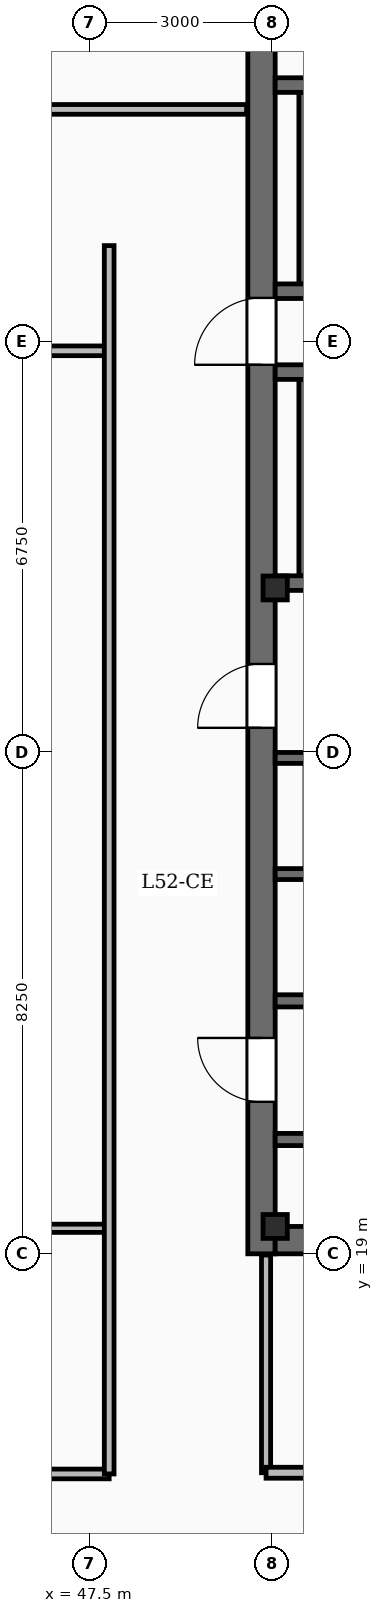
"""IFC4 building model, lengths in metres.
Left out: names, types, materials, properties, quantities, classifications, styles, units other than length and angle.
Written with IfcOpenShell. Run it as: python <this file> out.ifc"""

import sys

from ifc_helpers import new_model, si_unit, direction, frame, frame_2d, origin, origin_2d, place, context, subcontext, project, spatial, rectangle, i_section, extrude, element, fill, save


model = new_model("IFC4")
c1 = context("Model", 3, precision=1e-05, world=origin(), true_north=direction((0.0, 1.0)))
c2 = subcontext(c1, "Body", "Model", "MODEL_VIEW")
j1 = project(units=[si_unit("LENGTHUNIT", "METRE"), si_unit("PLANEANGLEUNIT", "RADIAN")], contexts=[c1])
p1 = place(None, origin())
s1 = spatial("IfcSite", under=j1, at=p1, CompositionType="ELEMENT")
p2 = place(p1, origin())
s2 = spatial("IfcBuilding", under=s1, at=p2, CompositionType="ELEMENT")
p3 = place(p2, frame((0.0, 0.0, 216.15)))
s3 = spatial("IfcBuildingStorey", under=s2, at=p3, CompositionType="ELEMENT", Elevation=216.15)
p4 = place(p3, frame((50.325, 19.0, -0.45), z_axis=(0.0, 0.0, 1.0), x_axis=(0.0, 1.0, 0.0)))
e1 = element("IfcWall", 1, at=p4, inside=s3, PredefinedType="SHEAR", context=c2, shape_type="SweptSolid", body=[
    extrude(rectangle(XDim=20.8, YDim=0.45, at=frame_2d((10.4, 0.0))), origin(), (0.0, 0.0, 1.0), 4.98),
])
p5 = place(p4, frame((2.5, 0.0, 0.45)))
e2 = element("IfcOpeningElement", 2, at=p5, cuts=e1, PredefinedType="OPENING", context=c2, shape_type="SweptSolid", body=[
    extrude(rectangle(XDim=1.05, YDim=2.15, at=frame_2d((0.525, 1.075))), frame((0.0, 0.235, 0.0), z_axis=(0.0, -1.0, 0.0), x_axis=(1.0, 0.0, 0.0)), (0.0, 0.0, 1.0), 0.47),
])
p6 = place(p4, frame((8.65, 0.0, 0.45)))
e3 = element("IfcOpeningElement", 3, at=p6, cuts=e1, PredefinedType="OPENING", context=c2, shape_type="SweptSolid", body=[
    extrude(rectangle(XDim=1.05, YDim=2.15, at=frame_2d((0.525, 1.075))), frame((0.0, 0.235, 0.0), z_axis=(0.0, -1.0, 0.0), x_axis=(1.0, 0.0, 0.0)), (0.0, 0.0, 1.0), 0.47),
])
p7 = place(p4, frame((14.62, 0.0, 0.45)))
e4 = element("IfcOpeningElement", 4, at=p7, cuts=e1, PredefinedType="OPENING", context=c2, shape_type="SweptSolid", body=[
    extrude(rectangle(XDim=1.1, YDim=2.15, at=frame_2d((0.55, 1.075))), frame((0.0, 0.235, 0.0), z_axis=(0.0, -1.0, 0.0), x_axis=(1.0, 0.0, 0.0)), (0.0, 0.0, 1.0), 0.47),
])
p8 = place(p3, frame((50.55, 19.225, -0.45), z_axis=(0.0, 0.0, 1.0), x_axis=(1.0, 0.0, 0.0)))
e5 = element("IfcWall", 5, at=p8, inside=s3, PredefinedType="SHEAR", context=c2, shape_type="SweptSolid", body=[
    extrude(rectangle(XDim=9.8, YDim=0.45, at=frame_2d((4.9, 0.0))), origin(), (0.0, 0.0, 1.0), 4.98),
])
for number, where, z_axis, x_axis in (
    (6, (50.55, 19.45, -0.45), (0.0, 0.0, 1.0), (1.0, 0.0, 0.0)),
    (7, (50.55, 29.95, -0.45), (0.0, 0.0, 1.0), (1.0, 0.0, 0.0)),
):
    element("IfcColumn", number, at=place(p3, frame(where, z_axis=z_axis, x_axis=x_axis)), inside=s3, PredefinedType="COLUMN", context=c2, shape_type="SweptSolid", body=[
        extrude(i_section(OverallWidth=0.399, OverallDepth=0.393, WebThickness=0.023, FlangeThickness=0.037, FilletRadius=0.02, at=origin_2d()), origin(), (0.0, 0.0, 1.0), 4.98),
    ])
p9 = place(p3, frame((60.35, 30.03, 0.0), z_axis=(0.0, 0.0, 1.0), x_axis=(-1.0, 0.0, 0.0)))
e8 = element("IfcWall", 8, at=p9, inside=s3, PredefinedType="SOLIDWALL", context=c2, shape_type="SweptSolid", body=[
    extrude(rectangle(XDim=9.8, YDim=0.24, at=frame_2d((4.9, 0.0))), origin(), (0.0, 0.0, 1.0), 4.53),
])
p10 = place(p9, frame((7.83, 0.0, 0.0)))
e9 = element("IfcOpeningElement", 9, at=p10, cuts=e8, PredefinedType="OPENING", context=c2, shape_type="SweptSolid", body=[
    extrude(rectangle(XDim=1.1, YDim=2.15, at=frame_2d((0.55, 1.075))), frame((0.0, 0.13, 0.0), z_axis=(0.0, -1.0, 0.0), x_axis=(1.0, 0.0, 0.0)), (0.0, 0.0, 1.0), 0.26),
])
p11 = place(p3, frame((50.55, 33.5, 0.0), z_axis=(0.0, 0.0, 1.0), x_axis=(1.0, 0.0, 0.0)))
e10 = element("IfcWall", 10, at=p11, inside=s3, PredefinedType="SOLIDWALL", context=c2, shape_type="SweptSolid", body=[
    extrude(rectangle(XDim=9.8, YDim=0.24, at=frame_2d((4.9, 0.0))), origin(), (0.0, 0.0, 1.0), 4.53),
])
p12 = place(p3, frame((51.06, 30.15, 0.0), z_axis=(0.0, 0.0, 1.0), x_axis=(0.0, 1.0, 0.0)))
e11 = element("IfcWall", 11, at=p12, inside=s3, PredefinedType="SOLIDWALL", context=c2, shape_type="SweptSolid", body=[
    extrude(rectangle(XDim=3.23, YDim=0.24, at=frame_2d((1.615, 0.0))), origin(), (0.0, 0.0, 1.0), 4.53),
])
p13 = place(p3, frame((60.35, 34.83, 0.0), z_axis=(0.0, 0.0, 1.0), x_axis=(-1.0, 0.0, 0.0)))
e12 = element("IfcWall", 12, at=p13, inside=s3, PredefinedType="SOLIDWALL", context=c2, shape_type="SweptSolid", body=[
    extrude(rectangle(XDim=9.8, YDim=0.24, at=frame_2d((4.9, 0.0))), origin(), (0.0, 0.0, 1.0), 4.53),
])
p14 = place(p13, frame((7.87, 0.0, 0.0)))
e13 = element("IfcOpeningElement", 13, at=p14, cuts=e12, PredefinedType="OPENING", context=c2, shape_type="SweptSolid", body=[
    extrude(rectangle(XDim=1.1, YDim=2.15, at=frame_2d((0.55, 1.075))), frame((0.0, 0.13, 0.0), z_axis=(0.0, -1.0, 0.0), x_axis=(1.0, 0.0, 0.0)), (0.0, 0.0, 1.0), 0.26),
])
p15 = place(p3, frame((50.55, 38.22, 0.0), z_axis=(0.0, 0.0, 1.0), x_axis=(1.0, 0.0, 0.0)))
e14 = element("IfcWall", 14, at=p15, inside=s3, PredefinedType="SOLIDWALL", context=c2, shape_type="SweptSolid", body=[
    extrude(rectangle(XDim=9.8, YDim=0.24, at=frame_2d((4.9, 0.0))), origin(), (0.0, 0.0, 1.0), 4.53),
])
p16 = place(p3, frame((51.06, 34.95, 0.0), z_axis=(0.0, 0.0, 1.0), x_axis=(0.0, 1.0, 0.0)))
e15 = element("IfcWall", 15, at=p16, inside=s3, PredefinedType="SOLIDWALL", context=c2, shape_type="SweptSolid", body=[
    extrude(rectangle(XDim=3.15, YDim=0.24, at=frame_2d((1.575, 0.0))), origin(), (0.0, 0.0, 1.0), 4.53),
])
p17 = place(p3, frame((50.55, 27.155, 0.0), z_axis=(0.0, 0.0, 1.0), x_axis=(1.0, 0.0, 0.0)))
e16 = element("IfcWall", 16, at=p17, inside=s3, PredefinedType="SOLIDWALL", context=c2, shape_type="SweptSolid", body=[
    extrude(rectangle(XDim=3.315, YDim=0.18, at=frame_2d((1.657, 0.0))), origin(), (0.0, 0.0, 1.0), 4.53),
])
p18 = place(p17, frame((1.235, 0.0, 0.0)))
e17 = element("IfcOpeningElement", 17, at=p18, cuts=e16, PredefinedType="OPENING", context=c2, shape_type="SweptSolid", body=[
    extrude(rectangle(XDim=1.35, YDim=2.3, at=frame_2d((0.675, 1.15))), frame((0.0, 0.1, 0.0), z_axis=(0.0, -1.0, 0.0), x_axis=(1.0, 0.0, 0.0)), (0.0, 0.0, 1.0), 0.2),
])
p19 = place(p3, frame((50.55, 25.245, 0.0), z_axis=(0.0, 0.0, 1.0), x_axis=(1.0, 0.0, 0.0)))
e18 = element("IfcWall", 18, at=p19, inside=s3, PredefinedType="SOLIDWALL", context=c2, shape_type="SweptSolid", body=[
    extrude(rectangle(XDim=3.315, YDim=0.18, at=frame_2d((1.657, 0.0))), origin(), (0.0, 0.0, 1.0), 4.53),
])
p20 = place(p3, frame((50.55, 20.88, 0.0), z_axis=(0.0, 0.0, 1.0), x_axis=(1.0, 0.0, 0.0)))
e19 = element("IfcWall", 19, at=p20, inside=s3, PredefinedType="SOLIDWALL", context=c2, shape_type="SweptSolid", body=[
    extrude(rectangle(XDim=9.8, YDim=0.2, at=frame_2d((4.9, 0.0))), origin(), (0.0, 0.0, 1.0), 3.59),
])
p21 = place(p20, frame((1.4, 0.0, 0.0)))
e20 = element("IfcOpeningElement", 20, at=p21, cuts=e19, PredefinedType="OPENING", context=c2, shape_type="SweptSolid", body=[
    extrude(rectangle(XDim=1.05, YDim=2.15, at=frame_2d((0.525, 1.075))), frame((0.0, 0.11, 0.0), z_axis=(0.0, -1.0, 0.0), x_axis=(1.0, 0.0, 0.0)), (0.0, 0.0, 1.0), 0.22),
])
p22 = place(p20, frame((5.5, 0.0, 0.0)))
e21 = element("IfcOpeningElement", 21, at=p22, cuts=e19, PredefinedType="OPENING", context=c2, shape_type="SweptSolid", body=[
    extrude(rectangle(XDim=1.05, YDim=2.15, at=frame_2d((0.525, 1.075))), frame((0.0, 0.11, 0.0), z_axis=(0.0, -1.0, 0.0), x_axis=(1.0, 0.0, 0.0)), (0.0, 0.0, 1.0), 0.22),
])
p23 = place(p3, frame((50.55, 23.16, 0.0), z_axis=(0.0, 0.0, 1.0), x_axis=(1.0, 0.0, 0.0)))
e22 = element("IfcWall", 22, at=p23, inside=s3, PredefinedType="SOLIDWALL", context=c2, shape_type="SweptSolid", body=[
    extrude(rectangle(XDim=3.33, YDim=0.2, at=frame_2d((1.665, 0.0))), origin(), (0.0, 0.0, 1.0), 3.59),
])
p24 = place(p23, frame((0.55, 0.0, 0.0)))
e23 = element("IfcOpeningElement", 23, at=p24, cuts=e22, PredefinedType="OPENING", context=c2, shape_type="SweptSolid", body=[
    extrude(rectangle(XDim=0.86, YDim=2.05, at=frame_2d((0.43, 1.025))), frame((0.0, 0.11, 0.0), z_axis=(0.0, -1.0, 0.0), x_axis=(1.0, 0.0, 0.0)), (0.0, 0.0, 1.0), 0.22),
])
p25 = place(p3, frame((50.4, 15.4, 0.0), z_axis=(0.0, 0.0, 1.0), x_axis=(1.0, 0.0, 0.0)))
e24 = element("IfcWall", 24, at=p25, inside=s3, PredefinedType="SOLIDWALL", context=c2, shape_type="SweptSolid", body=[
    extrude(rectangle(XDim=10.0, YDim=0.18, at=frame_2d((5.0, 0.0))), origin(), (0.0, 0.0, 1.0), 3.59),
])
p26 = place(p25, frame((1.94, 0.0, 0.0)))
e25 = element("IfcOpeningElement", 25, at=p26, cuts=e24, PredefinedType="OPENING", context=c2, shape_type="SweptSolid", body=[
    extrude(rectangle(XDim=0.92, YDim=2.1, at=frame_2d((0.46, 1.05))), frame((0.0, 0.1, 0.0), z_axis=(0.0, -1.0, 0.0), x_axis=(1.0, 0.0, 0.0)), (0.0, 0.0, 1.0), 0.2),
])
p27 = place(p25, frame((6.97, 0.0, 0.0)))
e26 = element("IfcOpeningElement", 26, at=p27, cuts=e24, PredefinedType="OPENING", context=c2, shape_type="SweptSolid", body=[
    extrude(rectangle(XDim=0.86, YDim=2.05, at=frame_2d((0.43, 1.025))), frame((0.0, 0.1, 0.0), z_axis=(0.0, -1.0, 0.0), x_axis=(1.0, 0.0, 0.0)), (0.0, 0.0, 1.0), 0.2),
])
p28 = place(p3, frame((50.4, 15.4, 0.0), z_axis=(0.0, 0.0, 1.0), x_axis=(0.0, 1.0, 0.0)))
e27 = element("IfcWall", 27, at=p28, inside=s3, PredefinedType="PARTITIONING", context=c2, shape_type="SweptSolid", body=[
    extrude(rectangle(XDim=3.58, YDim=0.15, at=frame_2d((1.79, 0.0))), origin(), (0.0, 0.0, 1.0), 3.59),
])
p29 = place(p3, frame((27.08, 19.42, 0.0), z_axis=(0.0, 0.0, 1.0), x_axis=(1.0, 0.0, 0.0)))
e28 = element("IfcWall", 28, at=p29, inside=s3, PredefinedType="PARTITIONING", context=c2, shape_type="SweptSolid", body=[
    extrude(rectangle(XDim=20.74, YDim=0.135, at=frame_2d((10.37, 0.0))), origin(), (0.0, 0.0, 1.0), 3.59),
])
p30 = place(p29, frame((1.6, 0.0, 0.0)))
e29 = element("IfcOpeningElement", 29, at=p30, cuts=e28, PredefinedType="OPENING", context=c2, shape_type="SweptSolid", body=[
    extrude(rectangle(XDim=1.6, YDim=2.15, at=frame_2d((0.8, 1.075))), frame((0.0, 0.077, 0.0), z_axis=(0.0, -1.0, 0.0), x_axis=(1.0, 0.0, 0.0)), (0.0, 0.0, 1.0), 0.155),
])
p31 = place(p29, frame((14.2, 0.0, 0.0)))
e30 = element("IfcOpeningElement", 30, at=p31, cuts=e28, PredefinedType="OPENING", context=c2, shape_type="SweptSolid", body=[
    extrude(rectangle(XDim=1.6, YDim=2.15, at=frame_2d((0.8, 1.075))), frame((0.0, 0.077, 0.0), z_axis=(0.0, -1.0, 0.0), x_axis=(1.0, 0.0, 0.0)), (0.0, 0.0, 1.0), 0.155),
])
p32 = place(p3, frame((27.08, 33.85, 0.0), z_axis=(0.0, 0.0, 1.0), x_axis=(1.0, 0.0, 0.0)))
e31 = element("IfcWall", 31, at=p32, inside=s3, PredefinedType="PARTITIONING", context=c2, shape_type="SweptSolid", body=[
    extrude(rectangle(XDim=20.74, YDim=0.16, at=frame_2d((10.37, 0.0))), origin(), (0.0, 0.0, 1.0), 3.59),
])
p33 = place(p3, frame((27.08, 15.38, 0.0), z_axis=(0.0, 0.0, 1.0), x_axis=(1.0, 0.0, 0.0)))
e32 = element("IfcWall", 32, at=p33, inside=s3, PredefinedType="PARTITIONING", context=c2, shape_type="SweptSolid", body=[
    extrude(rectangle(XDim=20.74, YDim=0.16, at=frame_2d((10.37, 0.0))), origin(), (0.0, 0.0, 1.0), 3.59),
])
p34 = place(p33, frame((9.5, 0.0, 0.0)))
e33 = element("IfcOpeningElement", 33, at=p34, cuts=e32, PredefinedType="OPENING", context=c2, shape_type="SweptSolid", body=[
    extrude(rectangle(XDim=1.6, YDim=2.15, at=frame_2d((0.8, 1.075))), frame((0.0, 0.09, 0.0), z_axis=(0.0, -1.0, 0.0), x_axis=(1.0, 0.0, 0.0)), (0.0, 0.0, 1.0), 0.18),
])
p35 = place(p3, frame((47.82, 15.38, 0.0), z_axis=(0.0, 0.0, 1.0), x_axis=(0.0, 1.0, 0.0)))
e34 = element("IfcWall", 34, at=p35, inside=s3, PredefinedType="PARTITIONING", context=c2, shape_type="SweptSolid", body=[
    extrude(rectangle(XDim=20.2, YDim=0.16, at=frame_2d((10.1, 0.0))), origin(), (0.0, 0.0, 1.0), 3.59),
])
p36 = place(p3, frame((24.82, 37.82, 0.0), z_axis=(0.0, 0.0, 1.0), x_axis=(1.0, 0.0, 0.0)))
e35 = element("IfcWall", 35, at=p36, inside=s3, PredefinedType="PARTITIONING", context=c2, shape_type="SweptSolid", body=[
    extrude(rectangle(XDim=25.26, YDim=0.16, at=frame_2d((12.63, 0.0))), origin(), (0.0, 0.0, 1.0), 3.59),
])
p37 = place(p36, frame((3.5, 0.0, 0.0)))
e36 = element("IfcOpeningElement", 36, at=p37, cuts=e35, PredefinedType="OPENING", context=c2, shape_type="SweptSolid", body=[
    extrude(rectangle(XDim=1.6, YDim=2.15, at=frame_2d((0.8, 1.075))), frame((0.0, 0.09, 0.0), z_axis=(0.0, -1.0, 0.0), x_axis=(1.0, 0.0, 0.0)), (0.0, 0.0, 1.0), 0.18),
])
p38 = place(p36, frame((17.5, 0.0, 0.0)))
e37 = element("IfcOpeningElement", 37, at=p38, cuts=e35, PredefinedType="OPENING", context=c2, shape_type="SweptSolid", body=[
    extrude(rectangle(XDim=1.6, YDim=2.15, at=frame_2d((0.8, 1.075))), frame((0.0, 0.09, 0.0), z_axis=(0.0, -1.0, 0.0), x_axis=(1.0, 0.0, 0.0)), (0.0, 0.0, 1.0), 0.18),
])
p39 = place(p5, origin())
e38 = element("IfcDoor", 38, at=p39, inside=s3, OperationType="SINGLE_SWING_RIGHT", PredefinedType="DOOR", context=c2, shape_type="SweptSolid", body=[
    extrude(rectangle(XDim=1.05, YDim=2.15, at=frame_2d((0.525, 1.075))), frame((0.0, 0.025, 0.0), z_axis=(0.0, -1.0, 0.0), x_axis=(1.0, 0.0, 0.0)), (0.0, 0.0, 1.0), 0.05),
])
fill(e2, e38)
p40 = place(p6, origin())
e39 = element("IfcDoor", 39, at=p40, inside=s3, OperationType="SINGLE_SWING_LEFT", PredefinedType="DOOR", context=c2, shape_type="SweptSolid", body=[
    extrude(rectangle(XDim=1.05, YDim=2.15, at=frame_2d((0.525, 1.075))), frame((0.0, 0.025, 0.0), z_axis=(0.0, -1.0, 0.0), x_axis=(1.0, 0.0, 0.0)), (0.0, 0.0, 1.0), 0.05),
])
fill(e3, e39)
p41 = place(p7, origin())
e40 = element("IfcDoor", 40, at=p41, inside=s3, OperationType="SINGLE_SWING_LEFT", PredefinedType="DOOR", context=c2, shape_type="SweptSolid", body=[
    extrude(rectangle(XDim=1.1, YDim=2.15, at=frame_2d((0.55, 1.075))), frame((0.0, 0.025, 0.0), z_axis=(0.0, -1.0, 0.0), x_axis=(1.0, 0.0, 0.0)), (0.0, 0.0, 1.0), 0.05),
])
fill(e4, e40)
save(model, sys.argv[1])
